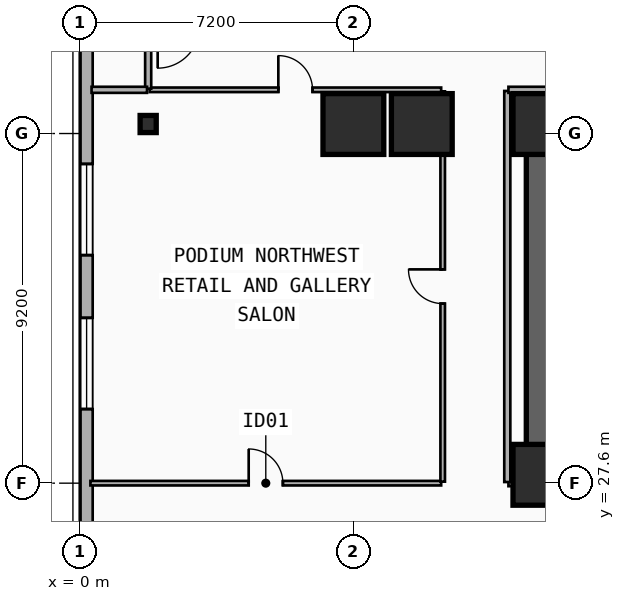
"""IFC4 building model, lengths in metres.
Left out: names, types, materials, properties, quantities, classifications, styles, units other than length and angle.
Written with IfcOpenShell. Run it as: python <this file> out.ifc"""

import sys

from ifc_helpers import new_model, si_unit, direction, frame, frame_2d, origin, origin_2d, place, context, subcontext, project, spatial, rectangle, i_section, extrude, element, fill, save


model = new_model("IFC4")
c1 = context("Model", 3, precision=1e-05, world=origin(), true_north=direction((0.0, 1.0)))
c2 = subcontext(c1, "Body", "Model", "MODEL_VIEW")
j1 = project(units=[si_unit("LENGTHUNIT", "METRE"), si_unit("PLANEANGLEUNIT", "RADIAN")], contexts=[c1])
p1 = place(None, origin())
s1 = spatial("IfcSite", under=j1, at=p1, CompositionType="ELEMENT")
p2 = place(p1, origin())
s2 = spatial("IfcBuilding", under=s1, at=p2, CompositionType="ELEMENT")
p3 = place(p2, frame((0.0, 0.0, 24.2)))
s3 = spatial("IfcBuildingStorey", under=s2, at=p3, CompositionType="ELEMENT", Elevation=24.2)
p4 = place(p3, frame((12.15, 37.05, 0.0), z_axis=(0.0, 0.0, 1.0), x_axis=(1.0, 0.0, 0.0)))
e1 = element("IfcWall", 1, at=p4, inside=s3, PredefinedType="SHEAR", context=c2, shape_type="SweptSolid", body=[
    extrude(rectangle(XDim=33.23, YDim=0.8, at=frame_2d((16.615, 0.0))), origin(), (0.0, 0.0, 1.0), 4.8),
])
p5 = place(p3, frame((21.18, 27.82, 0.0), z_axis=(0.0, 0.0, 1.0), x_axis=(-1.0, 0.0, 0.0)))
e2 = element("IfcWall", 2, at=p5, inside=s3, PredefinedType="SHEAR", context=c2, shape_type="SweptSolid", body=[
    extrude(rectangle(XDim=9.03, YDim=0.8, at=frame_2d((4.515, 0.0))), origin(), (0.0, 0.0, 1.0), 4.8),
])
p6 = place(p5, frame((2.68, 0.0, 0.0)))
e3 = element("IfcOpeningElement", 3, at=p6, cuts=e2, PredefinedType="OPENING", context=c2, shape_type="SweptSolid", body=[
    extrude(rectangle(XDim=1.1, YDim=2.15, at=frame_2d((0.55, 1.075))), frame((0.0, 0.41, 0.0), z_axis=(0.0, -1.0, 0.0), x_axis=(1.0, 0.0, 0.0)), (0.0, 0.0, 1.0), 0.82),
])
p7 = place(p3, frame((12.15, 28.22, 0.0), z_axis=(0.0, 0.0, 1.0), x_axis=(0.0, 1.0, 0.0)))
e4 = element("IfcWall", 4, at=p7, inside=s3, PredefinedType="SHEAR", context=c2, shape_type="SweptSolid", body=[
    extrude(rectangle(XDim=8.43, YDim=0.8, at=frame_2d((4.215, 0.0))), origin(), (0.0, 0.0, 1.0), 4.8),
])
for number, where, z_axis, x_axis in (
    (5, (12.2, 27.82, 0.0), (0.0, 0.0, 1.0), (1.0, 0.0, 0.0)),
    (6, (12.2, 37.05, 0.0), (0.0, 0.0, 1.0), (1.0, 0.0, 0.0)),
):
    element("IfcColumn", number, at=place(p3, frame(where, z_axis=z_axis, x_axis=x_axis)), inside=s3, PredefinedType="COLUMN", context=c2, shape_type="SweptSolid", body=[
        extrude(rectangle(XDim=1.6, YDim=1.6, at=origin_2d()), origin(), (0.0, 0.0, 1.0), 4.8),
    ])
p8 = place(p3, frame((1.8, 37.05, 0.0), z_axis=(0.0, 0.0, 1.0), x_axis=(1.0, 0.0, 0.0)))
e7 = element("IfcColumn", 7, at=p8, inside=s3, PredefinedType="COLUMN", context=c2, shape_type="SweptSolid", body=[
    extrude(i_section(OverallWidth=0.424, OverallDepth=0.45, WebThickness=0.041, FlangeThickness=0.065, FilletRadius=0.015, at=origin_2d()), origin(), (0.0, 0.0, 1.0), 4.8),
])
for number, where, z_axis, x_axis in (
    (8, (7.2, 37.05, 0.0), (0.0, 0.0, 1.0), (1.0, 0.0, 0.0)),
    (9, (9.0, 37.05, 0.0), (0.0, 0.0, 1.0), (1.0, 0.0, 0.0)),
):
    element("IfcColumn", number, at=place(p3, frame(where, z_axis=z_axis, x_axis=x_axis)), inside=s3, PredefinedType="COLUMN", context=c2, shape_type="SweptSolid", body=[
        extrude(rectangle(XDim=1.6, YDim=1.6, at=origin_2d()), origin(), (0.0, 0.0, 1.0), 4.8),
    ])
p9 = place(p3, frame((0.18, 7.2, 0.0), z_axis=(0.0, 0.0, 1.0), x_axis=(0.0, 1.0, 0.0)))
e10 = element("IfcWall", 10, at=p9, inside=s3, PredefinedType="SOLIDWALL", context=c2, shape_type="SweptSolid", body=[
    extrude(rectangle(XDim=34.4, YDim=0.32, at=frame_2d((17.2, 0.0))), origin(), (0.0, 0.0, 1.0), 4.48),
])
p10 = place(p9, frame((22.35, 0.0, 0.9)))
e11 = element("IfcOpeningElement", 11, at=p10, cuts=e10, PredefinedType="OPENING", context=c2, shape_type="SweptSolid", body=[
    extrude(rectangle(XDim=2.4, YDim=1.8, at=frame_2d((1.2, 0.9))), frame((0.0, 0.17, 0.0), z_axis=(0.0, -1.0, 0.0), x_axis=(1.0, 0.0, 0.0)), (0.0, 0.0, 1.0), 0.34),
])
p11 = place(p9, frame((26.4, 0.0, 0.9)))
e12 = element("IfcOpeningElement", 12, at=p11, cuts=e10, PredefinedType="OPENING", context=c2, shape_type="SweptSolid", body=[
    extrude(rectangle(XDim=2.4, YDim=1.8, at=frame_2d((1.2, 0.9))), frame((0.0, 0.17, 0.0), z_axis=(0.0, -1.0, 0.0), x_axis=(1.0, 0.0, 0.0)), (0.0, 0.0, 1.0), 0.34),
])
p12 = place(p9, frame((0.847, 0.0, 0.9)))
e13 = element("IfcOpeningElement", 13, at=p12, cuts=e10, PredefinedType="OPENING", context=c2, shape_type="SweptSolid", body=[
    extrude(rectangle(XDim=2.4, YDim=1.8, at=frame_2d((1.2, 0.9))), frame((0.0, 0.17, 0.0), z_axis=(0.0, -1.0, 0.0), x_axis=(1.0, 0.0, 0.0)), (0.0, 0.0, 1.0), 0.34),
])
p13 = place(p9, frame((3.773, 0.0, 0.9)))
e14 = element("IfcOpeningElement", 14, at=p13, cuts=e10, PredefinedType="OPENING", context=c2, shape_type="SweptSolid", body=[
    extrude(rectangle(XDim=2.4, YDim=1.8, at=frame_2d((1.2, 0.9))), frame((0.0, 0.17, 0.0), z_axis=(0.0, -1.0, 0.0), x_axis=(1.0, 0.0, 0.0)), (0.0, 0.0, 1.0), 0.34),
])
p14 = place(p9, frame((9.25, 0.0, 0.9)))
e15 = element("IfcOpeningElement", 15, at=p14, cuts=e10, PredefinedType="OPENING", context=c2, shape_type="SweptSolid", body=[
    extrude(rectangle(XDim=2.4, YDim=1.8, at=frame_2d((1.2, 0.9))), frame((0.0, 0.17, 0.0), z_axis=(0.0, -1.0, 0.0), x_axis=(1.0, 0.0, 0.0)), (0.0, 0.0, 1.0), 0.34),
])
p15 = place(p9, frame((13.6, 0.0, 0.9)))
e16 = element("IfcOpeningElement", 16, at=p15, cuts=e10, PredefinedType="OPENING", context=c2, shape_type="SweptSolid", body=[
    extrude(rectangle(XDim=2.4, YDim=1.8, at=frame_2d((1.2, 0.9))), frame((0.0, 0.17, 0.0), z_axis=(0.0, -1.0, 0.0), x_axis=(1.0, 0.0, 0.0)), (0.0, 0.0, 1.0), 0.34),
])
p16 = place(p3, frame((0.28, 27.6, 0.0), z_axis=(0.0, 0.0, 1.0), x_axis=(1.0, 0.0, 0.0)))
e17 = element("IfcWall", 17, at=p16, inside=s3, PredefinedType="PARTITIONING", context=c2, shape_type="SweptSolid", body=[
    extrude(rectangle(XDim=9.23, YDim=0.12, at=frame_2d((4.615, 0.0))), origin(), (0.0, 0.0, 1.0), 4.48),
])
p17 = place(p16, frame((4.165, 0.0, 0.0)))
e18 = element("IfcOpeningElement", 18, at=p17, cuts=e17, PredefinedType="OPENING", context=c2, shape_type="SweptSolid", body=[
    extrude(rectangle(XDim=0.9, YDim=2.1, at=frame_2d((0.45, 1.05))), frame((0.0, 0.07, 0.0), z_axis=(0.0, -1.0, 0.0), x_axis=(1.0, 0.0, 0.0)), (0.0, 0.0, 1.0), 0.14),
])
p18 = place(p3, frame((9.55, 27.64, 0.0), z_axis=(0.0, 0.0, 1.0), x_axis=(0.0, 1.0, 0.0)))
e19 = element("IfcWall", 19, at=p18, inside=s3, PredefinedType="PARTITIONING", context=c2, shape_type="SweptSolid", body=[
    extrude(rectangle(XDim=10.27, YDim=0.12, at=frame_2d((5.135, 0.0))), origin(), (0.0, 0.0, 1.0), 4.48),
])
p19 = place(p18, frame((4.685, 0.0, 0.0)))
e20 = element("IfcOpeningElement", 20, at=p19, cuts=e19, PredefinedType="OPENING", context=c2, shape_type="SweptSolid", body=[
    extrude(rectangle(XDim=0.9, YDim=2.1, at=frame_2d((0.45, 1.05))), frame((0.0, 0.07, 0.0), z_axis=(0.0, -1.0, 0.0), x_axis=(1.0, 0.0, 0.0)), (0.0, 0.0, 1.0), 0.14),
])
p20 = place(p3, frame((1.84, 37.95, 0.0), z_axis=(0.0, 0.0, 1.0), x_axis=(1.0, 0.0, 0.0)))
e21 = element("IfcWall", 21, at=p20, inside=s3, PredefinedType="PARTITIONING", context=c2, shape_type="SweptSolid", body=[
    extrude(rectangle(XDim=7.67, YDim=0.12, at=frame_2d((3.835, 0.0))), origin(), (0.0, 0.0, 1.0), 4.48),
])
p21 = place(p20, frame((3.385, 0.0, 0.0)))
e22 = element("IfcOpeningElement", 22, at=p21, cuts=e21, PredefinedType="OPENING", context=c2, shape_type="SweptSolid", body=[
    extrude(rectangle(XDim=0.9, YDim=2.1, at=frame_2d((0.45, 1.05))), frame((0.0, 0.07, 0.0), z_axis=(0.0, -1.0, 0.0), x_axis=(1.0, 0.0, 0.0)), (0.0, 0.0, 1.0), 0.14),
])
p22 = place(p3, frame((11.28, 27.6, 0.0), z_axis=(0.0, 0.0, 1.0), x_axis=(1.0, 0.0, 0.0)))
e23 = element("IfcWall", 23, at=p22, inside=s3, PredefinedType="PARTITIONING", context=c2, shape_type="SweptSolid", body=[
    extrude(rectangle(XDim=0.84, YDim=0.16, at=frame_2d((0.42, 0.0))), origin(), (0.0, 0.0, 1.0), 3.452),
])
p23 = place(p3, frame((11.25, 27.63, 0.0), z_axis=(0.0, 0.0, 1.0), x_axis=(0.0, 1.0, 0.0)))
e24 = element("IfcWall", 24, at=p23, inside=s3, PredefinedType="PARTITIONING", context=c2, shape_type="SweptSolid", body=[
    extrude(rectangle(XDim=10.29, YDim=0.16, at=frame_2d((5.145, 0.0))), origin(), (0.0, 0.0, 1.0), 4.48),
])
p24 = place(p3, frame((11.28, 37.95, 0.0), z_axis=(0.0, 0.0, 1.0), x_axis=(1.0, 0.0, 0.0)))
e25 = element("IfcWall", 25, at=p24, inside=s3, PredefinedType="PARTITIONING", context=c2, shape_type="SweptSolid", body=[
    extrude(rectangle(XDim=35.04, YDim=0.16, at=frame_2d((17.52, 0.0))), origin(), (0.0, 0.0, 1.0), 3.81),
])
p25 = place(p3, frame((1.8, 37.98, 0.0), z_axis=(0.0, 0.0, 1.0), x_axis=(0.0, 1.0, 0.0)))
e26 = element("IfcWall", 26, at=p25, inside=s3, PredefinedType="PARTITIONING", context=c2, shape_type="SweptSolid", body=[
    extrude(rectangle(XDim=1.785, YDim=0.16, at=frame_2d((0.893, 0.0))), origin(), (0.0, 0.0, 1.0), 4.48),
])
p26 = place(p3, frame((0.31, 37.95, 0.0), z_axis=(0.0, 0.0, 1.0), x_axis=(1.0, 0.0, 0.0)))
e27 = element("IfcWall", 27, at=p26, inside=s3, PredefinedType="PARTITIONING", context=c2, shape_type="SweptSolid", body=[
    extrude(rectangle(XDim=1.46, YDim=0.16, at=frame_2d((0.73, 0.0))), origin(), (0.0, 0.0, 1.0), 4.48),
])
p27 = place(p10, origin())
e28 = element("IfcWindow", 28, at=p27, inside=s3, PartitioningType="SINGLE_PANEL", PredefinedType="WINDOW", context=c2, shape_type="SweptSolid", body=[
    extrude(rectangle(XDim=2.4, YDim=1.8, at=frame_2d((1.2, 0.9))), frame((0.0, 0.03, 0.0), z_axis=(0.0, -1.0, 0.0), x_axis=(1.0, 0.0, 0.0)), (0.0, 0.0, 1.0), 0.06),
])
fill(e11, e28)
p28 = place(p11, origin())
e29 = element("IfcWindow", 29, at=p28, inside=s3, PartitioningType="SINGLE_PANEL", PredefinedType="WINDOW", context=c2, shape_type="SweptSolid", body=[
    extrude(rectangle(XDim=2.4, YDim=1.8, at=frame_2d((1.2, 0.9))), frame((0.0, 0.03, 0.0), z_axis=(0.0, -1.0, 0.0), x_axis=(1.0, 0.0, 0.0)), (0.0, 0.0, 1.0), 0.06),
])
fill(e12, e29)
p29 = place(p17, origin())
e30 = element("IfcDoor", 30, at=p29, inside=s3, OperationType="SINGLE_SWING_LEFT", PredefinedType="DOOR", context=c2, shape_type="SweptSolid", body=[
    extrude(rectangle(XDim=0.9, YDim=2.1, at=frame_2d((0.45, 1.05))), frame((0.0, 0.025, 0.0), z_axis=(0.0, -1.0, 0.0), x_axis=(1.0, 0.0, 0.0)), (0.0, 0.0, 1.0), 0.05),
])
fill(e18, e30)
p30 = place(p19, origin())
e31 = element("IfcDoor", 31, at=p30, inside=s3, OperationType="SINGLE_SWING_RIGHT", PredefinedType="DOOR", context=c2, shape_type="SweptSolid", body=[
    extrude(rectangle(XDim=0.9, YDim=2.1, at=frame_2d((0.45, 1.05))), frame((0.0, 0.025, 0.0), z_axis=(0.0, -1.0, 0.0), x_axis=(1.0, 0.0, 0.0)), (0.0, 0.0, 1.0), 0.05),
])
fill(e20, e31)
p31 = place(p21, origin())
e32 = element("IfcDoor", 32, at=p31, inside=s3, OperationType="SINGLE_SWING_LEFT", PredefinedType="DOOR", context=c2, shape_type="SweptSolid", body=[
    extrude(rectangle(XDim=0.9, YDim=2.1, at=frame_2d((0.45, 1.05))), frame((0.0, 0.025, 0.0), z_axis=(0.0, -1.0, 0.0), x_axis=(1.0, 0.0, 0.0)), (0.0, 0.0, 1.0), 0.05),
])
fill(e22, e32)
save(model, sys.argv[1])
